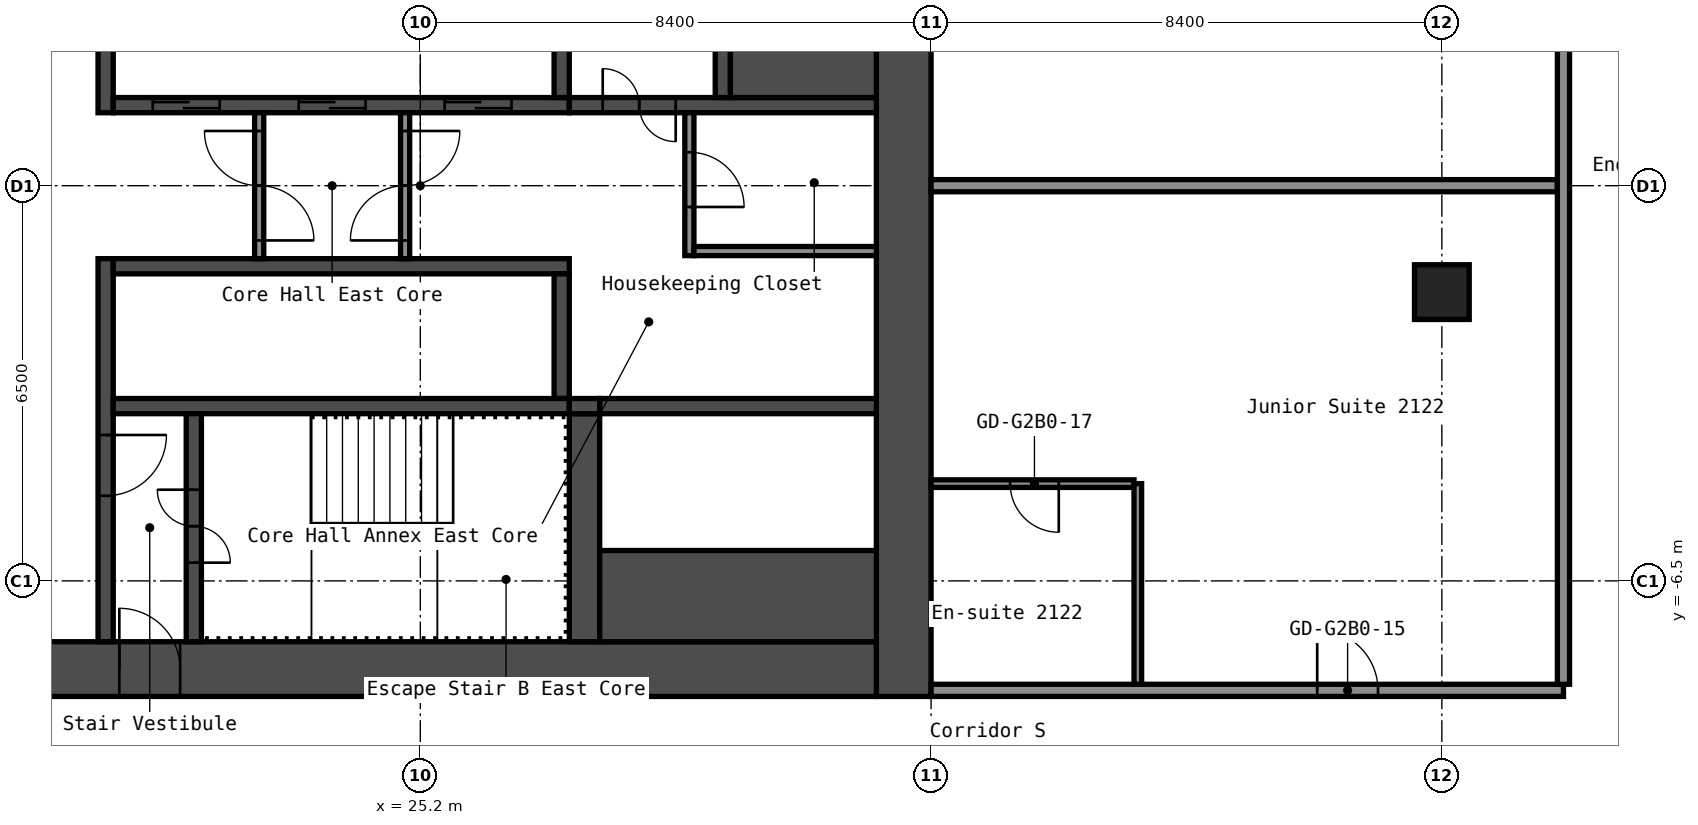
"""IFC4 building model, lengths in metres.
Left out: names, types, materials, properties, quantities, classifications, styles, units other than length and angle.
Written with IfcOpenShell. Run it as: python <this file> out.ifc"""

import sys

from ifc_helpers import new_model, si_unit, direction, frame, frame_2d, origin, origin_2d, place, context, subcontext, project, spatial, rectangle, hollow_rectangle, extrude, element, fill, save


model = new_model("IFC4")
c1 = context("Model", 3, precision=1e-05, world=origin(), true_north=direction((0.0, 1.0)))
c2 = subcontext(c1, "Body", "Model", "MODEL_VIEW")
j1 = project(units=[si_unit("LENGTHUNIT", "METRE"), si_unit("PLANEANGLEUNIT", "RADIAN")], contexts=[c1])
p1 = place(None, origin())
s1 = spatial("IfcSite", under=j1, at=p1, CompositionType="ELEMENT")
p2 = place(p1, origin())
s2 = spatial("IfcBuilding", under=s1, at=p2, CompositionType="ELEMENT")
p3 = place(p2, frame((0.0, 0.0, 78.6)))
s3 = spatial("IfcBuildingStorey", under=s2, at=p3, CompositionType="ELEMENT", Elevation=78.6)
p4 = place(p3, frame((42.0, -1.75, 0.0), z_axis=(0.0, 0.0, 1.0), x_axis=(1.0, 0.0, 0.0)))
e1 = element("IfcColumn", 1, at=p4, inside=s3, PredefinedType="COLUMN", context=c2, shape_type="SweptSolid", body=[
    extrude(hollow_rectangle(XDim=0.9, YDim=0.9, WallThickness=0.036, at=origin_2d()), origin(), (0.0, 0.0, 1.0), 2.8),
])
p5 = place(p3, frame((33.15, -8.4, 0.0), z_axis=(0.0, 0.0, 1.0), x_axis=(0.0, 1.0, 0.0)))
e2 = element("IfcWall", 2, at=p5, inside=s3, PredefinedType="SHEAR", context=c2, shape_type="SweptSolid", body=[
    extrude(rectangle(XDim=16.8, YDim=0.9, at=frame_2d((8.4, 0.0))), origin(), (0.0, 0.0, 1.0), 2.8),
])
p6 = place(p3, frame((17.7, -7.95, 0.0), z_axis=(0.0, 0.0, 1.0), x_axis=(1.0, 0.0, 0.0)))
e3 = element("IfcWall", 3, at=p6, inside=s3, PredefinedType="SHEAR", context=c2, shape_type="SweptSolid", body=[
    extrude(rectangle(XDim=15.0, YDim=0.9, at=frame_2d((7.5, 0.0))), origin(), (0.0, 0.0, 1.0), 2.8),
])
p7 = place(p6, frame((2.55, 0.0, 0.0)))
e4 = element("IfcOpeningElement", 4, at=p7, cuts=e3, PredefinedType="OPENING", context=c2, shape_type="SweptSolid", body=[
    extrude(rectangle(XDim=1.0, YDim=2.1, at=frame_2d((0.5, 1.05))), frame((0.0, 0.46, 0.0), z_axis=(0.0, -1.0, 0.0), x_axis=(1.0, 0.0, 0.0)), (0.0, 0.0, 1.0), 0.92),
])
p8 = place(p3, frame((20.025, 1.2, 0.0), z_axis=(0.0, 0.0, 1.0), x_axis=(0.0, 1.0, 0.0)))
e5 = element("IfcWall", 5, at=p8, inside=s3, PredefinedType="SHEAR", context=c2, shape_type="SweptSolid", body=[
    extrude(rectangle(XDim=6.3, YDim=0.25, at=frame_2d((3.15, 0.0))), origin(), (0.0, 0.0, 1.0), 2.8),
])
p9 = place(p3, frame((20.025, -7.5, 0.0), z_axis=(0.0, 0.0, 1.0), x_axis=(0.0, 1.0, 0.0)))
e6 = element("IfcWall", 6, at=p9, inside=s3, PredefinedType="SHEAR", context=c2, shape_type="SweptSolid", body=[
    extrude(rectangle(XDim=6.3, YDim=0.25, at=frame_2d((3.15, 0.0))), origin(), (0.0, 0.0, 1.0), 2.8),
])
p10 = place(p9, frame((2.4, 0.0, 0.0)))
e7 = element("IfcOpeningElement", 7, at=p10, cuts=e6, PredefinedType="OPENING", context=c2, shape_type="SweptSolid", body=[
    extrude(rectangle(XDim=1.0, YDim=2.1, at=frame_2d((0.5, 1.05))), frame((0.0, 0.135, 0.0), z_axis=(0.0, -1.0, 0.0), x_axis=(1.0, 0.0, 0.0)), (0.0, 0.0, 1.0), 0.27),
])
p11 = place(p3, frame((20.15, 1.325, 0.0), z_axis=(0.0, 0.0, 1.0), x_axis=(1.0, 0.0, 0.0)))
e8 = element("IfcWall", 8, at=p11, inside=s3, PredefinedType="SHEAR", context=c2, shape_type="SweptSolid", body=[
    extrude(rectangle(XDim=7.5, YDim=0.25, at=frame_2d((3.75, 0.0))), origin(), (0.0, 0.0, 1.0), 2.8),
])
p12 = place(p11, frame((0.65, 0.0, 0.0)))
e9 = element("IfcOpeningElement", 9, at=p12, cuts=e8, PredefinedType="OPENING", context=c2, shape_type="SweptSolid", body=[
    extrude(rectangle(XDim=1.1, YDim=2.1, at=frame_2d((0.55, 1.05))), frame((0.0, 0.135, 0.0), z_axis=(0.0, -1.0, 0.0), x_axis=(1.0, 0.0, 0.0)), (0.0, 0.0, 1.0), 0.27),
])
p13 = place(p11, frame((3.05, 0.0, 0.0)))
e10 = element("IfcOpeningElement", 10, at=p13, cuts=e8, PredefinedType="OPENING", context=c2, shape_type="SweptSolid", body=[
    extrude(rectangle(XDim=1.1, YDim=2.1, at=frame_2d((0.55, 1.05))), frame((0.0, 0.135, 0.0), z_axis=(0.0, -1.0, 0.0), x_axis=(1.0, 0.0, 0.0)), (0.0, 0.0, 1.0), 0.27),
])
p14 = place(p11, frame((5.45, 0.0, 0.0)))
e11 = element("IfcOpeningElement", 11, at=p14, cuts=e8, PredefinedType="OPENING", context=c2, shape_type="SweptSolid", body=[
    extrude(rectangle(XDim=1.1, YDim=2.1, at=frame_2d((0.55, 1.05))), frame((0.0, 0.135, 0.0), z_axis=(0.0, -1.0, 0.0), x_axis=(1.0, 0.0, 0.0)), (0.0, 0.0, 1.0), 0.27),
])
p15 = place(p3, frame((27.525, 1.45, 0.0), z_axis=(0.0, 0.0, 1.0), x_axis=(0.0, 1.0, 0.0)))
e12 = element("IfcWall", 12, at=p15, inside=s3, PredefinedType="SHEAR", context=c2, shape_type="SweptSolid", body=[
    extrude(rectangle(XDim=2.05, YDim=0.25, at=frame_2d((1.025, 0.0))), origin(), (0.0, 0.0, 1.0), 2.8),
])
p16 = place(p3, frame((27.65, 1.325, 0.0), z_axis=(0.0, 0.0, 1.0), x_axis=(1.0, 0.0, 0.0)))
e13 = element("IfcWall", 13, at=p16, inside=s3, PredefinedType="SHEAR", context=c2, shape_type="SweptSolid", body=[
    extrude(rectangle(XDim=5.05, YDim=0.25, at=frame_2d((2.525, 0.0))), origin(), (0.0, 0.0, 1.0), 2.8),
])
p17 = place(p16, frame((0.55, 0.0, 0.0)))
e14 = element("IfcOpeningElement", 14, at=p17, cuts=e13, PredefinedType="OPENING", context=c2, shape_type="SweptSolid", body=[
    extrude(rectangle(XDim=1.2, YDim=2.1, at=frame_2d((0.6, 1.05))), frame((0.0, 0.135, 0.0), z_axis=(0.0, -1.0, 0.0), x_axis=(1.0, 0.0, 0.0)), (0.0, 0.0, 1.0), 0.27),
])
p18 = place(p3, frame((30.175, 1.45, 0.0), z_axis=(0.0, 0.0, 1.0), x_axis=(0.0, 1.0, 0.0)))
e15 = element("IfcWall", 15, at=p18, inside=s3, PredefinedType="SHEAR", context=c2, shape_type="SweptSolid", body=[
    extrude(rectangle(XDim=6.05, YDim=0.25, at=frame_2d((3.025, 0.0))), origin(), (0.0, 0.0, 1.0), 2.8),
])
p19 = place(p18, frame((2.625, 0.0, 0.0)))
e16 = element("IfcOpeningElement", 16, at=p19, cuts=e15, PredefinedType="OPENING", context=c2, shape_type="SweptSolid", body=[
    extrude(rectangle(XDim=1.1, YDim=2.1, at=frame_2d((0.55, 1.05))), frame((0.0, 0.135, 0.0), z_axis=(0.0, -1.0, 0.0), x_axis=(1.0, 0.0, 0.0)), (0.0, 0.0, 1.0), 0.27),
])
p20 = place(p3, frame((30.3, 2.375, 0.0), z_axis=(0.0, 0.0, 1.0), x_axis=(1.0, 0.0, 0.0)))
e17 = element("IfcWall", 17, at=p20, inside=s3, PredefinedType="SHEAR", context=c2, shape_type="SweptSolid", body=[
    extrude(rectangle(XDim=2.4, YDim=1.85, at=frame_2d((1.2, 0.0))), origin(), (0.0, 0.0, 1.0), 2.8),
])
p21 = place(p3, frame((20.15, -1.325, 0.0), z_axis=(0.0, 0.0, 1.0), x_axis=(1.0, 0.0, 0.0)))
e18 = element("IfcWall", 18, at=p21, inside=s3, PredefinedType="SHEAR", context=c2, shape_type="SweptSolid", body=[
    extrude(rectangle(XDim=7.5, YDim=0.25, at=frame_2d((3.75, 0.0))), origin(), (0.0, 0.0, 1.0), 2.8),
])
p22 = place(p3, frame((27.525, -3.5, 0.0), z_axis=(0.0, 0.0, 1.0), x_axis=(0.0, 1.0, 0.0)))
e19 = element("IfcWall", 19, at=p22, inside=s3, PredefinedType="SHEAR", context=c2, shape_type="SweptSolid", body=[
    extrude(rectangle(XDim=2.05, YDim=0.25, at=frame_2d((1.025, 0.0))), origin(), (0.0, 0.0, 1.0), 2.8),
])
p23 = place(p3, frame((20.15, -3.625, 0.0), z_axis=(0.0, 0.0, 1.0), x_axis=(1.0, 0.0, 0.0)))
e20 = element("IfcWall", 20, at=p23, inside=s3, PredefinedType="SHEAR", context=c2, shape_type="SweptSolid", body=[
    extrude(rectangle(XDim=7.5, YDim=0.25, at=frame_2d((3.75, 0.0))), origin(), (0.0, 0.0, 1.0), 2.8),
])
p24 = place(p3, frame((21.475, -7.5, 0.0), z_axis=(0.0, 0.0, 1.0), x_axis=(0.0, 1.0, 0.0)))
e21 = element("IfcWall", 21, at=p24, inside=s3, PredefinedType="SHEAR", context=c2, shape_type="SweptSolid", body=[
    extrude(rectangle(XDim=3.75, YDim=0.25, at=frame_2d((1.875, 0.0))), origin(), (0.0, 0.0, 1.0), 2.8),
])
p25 = place(p24, frame((1.3, 0.0, 0.0)))
e22 = element("IfcOpeningElement", 22, at=p25, cuts=e21, PredefinedType="OPENING", context=c2, shape_type="SweptSolid", body=[
    extrude(rectangle(XDim=1.2, YDim=2.1, at=frame_2d((0.6, 1.05))), frame((0.0, 0.135, 0.0), z_axis=(0.0, -1.0, 0.0), x_axis=(1.0, 0.0, 0.0)), (0.0, 0.0, 1.0), 0.27),
])
p26 = place(p3, frame((27.9, -7.5, 0.0), z_axis=(0.0, 0.0, 1.0), x_axis=(0.0, 1.0, 0.0)))
e23 = element("IfcWall", 23, at=p26, inside=s3, PredefinedType="SHEAR", context=c2, shape_type="SweptSolid", body=[
    extrude(rectangle(XDim=3.75, YDim=0.5, at=frame_2d((1.875, 0.0))), origin(), (0.0, 0.0, 1.0), 2.8),
])
p27 = place(p3, frame((28.15, -3.625, 0.0), z_axis=(0.0, 0.0, 1.0), x_axis=(1.0, 0.0, 0.0)))
e24 = element("IfcWall", 24, at=p27, inside=s3, PredefinedType="SHEAR", context=c2, shape_type="SweptSolid", body=[
    extrude(rectangle(XDim=4.55, YDim=0.25, at=frame_2d((2.275, 0.0))), origin(), (0.0, 0.0, 1.0), 2.8),
])
p28 = place(p3, frame((28.15, -6.75, 0.0), z_axis=(0.0, 0.0, 1.0), x_axis=(1.0, 0.0, 0.0)))
e25 = element("IfcWall", 25, at=p28, inside=s3, PredefinedType="SHEAR", context=c2, shape_type="SweptSolid", body=[
    extrude(rectangle(XDim=4.55, YDim=1.5, at=frame_2d((2.275, 0.0))), origin(), (0.0, 0.0, 1.0), 2.8),
])
p29 = place(p3, frame((27.65, -3.625, 0.0), z_axis=(0.0, 0.0, 1.0), x_axis=(1.0, 0.0, 0.0)))
e26 = element("IfcWall", 26, at=p29, inside=s3, PredefinedType="SHEAR", context=c2, shape_type="SweptSolid", body=[
    extrude(rectangle(XDim=0.5, YDim=0.25, at=frame_2d((0.25, 0.0))), origin(), (0.0, 0.0, 1.0), 2.8),
])
p30 = place(p3, frame((22.55, -1.2, 0.0), z_axis=(0.0, 0.0, 1.0), x_axis=(0.0, 1.0, 0.0)))
e27 = element("IfcWall", 27, at=p30, inside=s3, PredefinedType="PARTITIONING", context=c2, shape_type="SweptSolid", body=[
    extrude(rectangle(XDim=2.4, YDim=0.15, at=frame_2d((1.2, 0.0))), origin(), (0.0, 0.0, 1.0), 2.8),
])
p31 = place(p30, frame((0.3, 0.0, 0.0)))
e28 = element("IfcOpeningElement", 28, at=p31, cuts=e27, PredefinedType="OPENING", context=c2, shape_type="SweptSolid", body=[
    extrude(rectangle(XDim=1.8, YDim=2.1, at=frame_2d((0.9, 1.05))), frame((0.0, 0.085, 0.0), z_axis=(0.0, -1.0, 0.0), x_axis=(1.0, 0.0, 0.0)), (0.0, 0.0, 1.0), 0.17),
])
p32 = place(p3, frame((24.95, -1.2, 0.0), z_axis=(0.0, 0.0, 1.0), x_axis=(0.0, 1.0, 0.0)))
e29 = element("IfcWall", 29, at=p32, inside=s3, PredefinedType="PARTITIONING", context=c2, shape_type="SweptSolid", body=[
    extrude(rectangle(XDim=2.4, YDim=0.15, at=frame_2d((1.2, 0.0))), origin(), (0.0, 0.0, 1.0), 2.8),
])
p33 = place(p32, frame((0.3, 0.0, 0.0)))
e30 = element("IfcOpeningElement", 30, at=p33, cuts=e29, PredefinedType="OPENING", context=c2, shape_type="SweptSolid", body=[
    extrude(rectangle(XDim=1.8, YDim=2.1, at=frame_2d((0.9, 1.05))), frame((0.0, 0.085, 0.0), z_axis=(0.0, -1.0, 0.0), x_axis=(1.0, 0.0, 0.0)), (0.0, 0.0, 1.0), 0.17),
])
p34 = place(p3, frame((29.625, -1.15, 0.0), z_axis=(0.0, 0.0, 1.0), x_axis=(0.0, 1.0, 0.0)))
e31 = element("IfcWall", 31, at=p34, inside=s3, PredefinedType="PARTITIONING", context=c2, shape_type="SweptSolid", body=[
    extrude(rectangle(XDim=2.35, YDim=0.15, at=frame_2d((1.175, 0.0))), origin(), (0.0, 0.0, 1.0), 2.8),
])
p35 = place(p34, frame((0.8, 0.0, 0.0)))
e32 = element("IfcOpeningElement", 32, at=p35, cuts=e31, PredefinedType="OPENING", context=c2, shape_type="SweptSolid", body=[
    extrude(rectangle(XDim=0.9, YDim=2.1, at=frame_2d((0.45, 1.05))), frame((0.0, 0.085, 0.0), z_axis=(0.0, -1.0, 0.0), x_axis=(1.0, 0.0, 0.0)), (0.0, 0.0, 1.0), 0.17),
])
p36 = place(p3, frame((29.7, -1.075, 0.0), z_axis=(0.0, 0.0, 1.0), x_axis=(1.0, 0.0, 0.0)))
e33 = element("IfcWall", 33, at=p36, inside=s3, PredefinedType="PARTITIONING", context=c2, shape_type="SweptSolid", body=[
    extrude(rectangle(XDim=3.0, YDim=0.15, at=frame_2d((1.5, 0.0))), origin(), (0.0, 0.0, 1.0), 2.8),
])
p37 = place(p3, frame((33.6, -8.3, 0.0), z_axis=(0.0, 0.0, 1.0), x_axis=(1.0, 0.0, 0.0)))
e34 = element("IfcWall", 34, at=p37, inside=s3, PredefinedType="PARTITIONING", context=c2, shape_type="SweptSolid", body=[
    extrude(rectangle(XDim=10.4, YDim=0.2, at=frame_2d((5.2, 0.0))), origin(), (0.0, 0.0, 1.0), 2.8),
])
p38 = place(p37, frame((6.35, 0.0, 0.0)))
e35 = element("IfcOpeningElement", 35, at=p38, cuts=e34, PredefinedType="OPENING", context=c2, shape_type="SweptSolid", body=[
    extrude(rectangle(XDim=1.0, YDim=2.1, at=frame_2d((0.5, 1.05))), frame((0.0, 0.11, 0.0), z_axis=(0.0, -1.0, 0.0), x_axis=(1.0, 0.0, 0.0)), (0.0, 0.0, 1.0), 0.22),
])
p39 = place(p3, frame((33.6, -4.9, 0.0), z_axis=(0.0, 0.0, 1.0), x_axis=(1.0, 0.0, 0.0)))
e36 = element("IfcWall", 36, at=p39, inside=s3, PredefinedType="PARTITIONING", context=c2, shape_type="SweptSolid", body=[
    extrude(rectangle(XDim=3.337, YDim=0.125, at=frame_2d((1.669, 0.0))), origin(), (0.0, 0.0, 1.0), 2.8),
])
p40 = place(p39, frame((1.3, 0.0, 0.0)))
e37 = element("IfcOpeningElement", 37, at=p40, cuts=e36, PredefinedType="OPENING", context=c2, shape_type="SweptSolid", body=[
    extrude(rectangle(XDim=0.8, YDim=2.1, at=frame_2d((0.4, 1.05))), frame((0.0, 0.073, 0.0), z_axis=(0.0, -1.0, 0.0), x_axis=(1.0, 0.0, 0.0)), (0.0, 0.0, 1.0), 0.145),
])
p41 = place(p3, frame((33.6, 0.0, 0.0), z_axis=(0.0, 0.0, 1.0), x_axis=(1.0, 0.0, 0.0)))
e38 = element("IfcWall", 38, at=p41, inside=s3, PredefinedType="PARTITIONING", context=c2, shape_type="SweptSolid", body=[
    extrude(rectangle(XDim=10.3, YDim=0.2, at=frame_2d((5.15, 0.0))), origin(), (0.0, 0.0, 1.0), 2.8),
])
p42 = place(p3, frame((37.0, -8.2, 0.0), z_axis=(0.0, 0.0, 1.0), x_axis=(0.0, 1.0, 0.0)))
e39 = element("IfcWall", 39, at=p42, inside=s3, PredefinedType="PARTITIONING", context=c2, shape_type="SweptSolid", body=[
    extrude(rectangle(XDim=3.3, YDim=0.125, at=frame_2d((1.65, 0.0))), origin(), (0.0, 0.0, 1.0), 2.8),
])
p43 = place(p3, frame((44.0, -8.2, 0.0), z_axis=(0.0, 0.0, 1.0), x_axis=(0.0, 1.0, 0.0)))
e40 = element("IfcWall", 40, at=p43, inside=s3, PredefinedType="PARTITIONING", context=c2, shape_type="SweptSolid", body=[
    extrude(rectangle(XDim=16.4, YDim=0.2, at=frame_2d((8.2, 0.0))), origin(), (0.0, 0.0, 1.0), 2.8),
])
p44 = place(p7, origin())
e41 = element("IfcDoor", 41, at=p44, inside=s3, OperationType="SINGLE_SWING_RIGHT", PredefinedType="DOOR", context=c2, shape_type="SweptSolid", body=[
    extrude(rectangle(XDim=1.0, YDim=2.1, at=frame_2d((0.5, 1.05))), frame((0.0, 0.025, 0.0), z_axis=(0.0, -1.0, 0.0), x_axis=(1.0, 0.0, 0.0)), (0.0, 0.0, 1.0), 0.05),
])
fill(e4, e41)
p45 = place(p25, origin())
e42 = element("IfcDoor", 42, at=p45, inside=s3, OperationType="DOUBLE_DOOR_SINGLE_SWING", PredefinedType="DOOR", context=c2, shape_type="SweptSolid", body=[
    extrude(rectangle(XDim=1.2, YDim=2.1, at=frame_2d((0.6, 1.05))), frame((0.0, 0.025, 0.0), z_axis=(0.0, -1.0, 0.0), x_axis=(1.0, 0.0, 0.0)), (0.0, 0.0, 1.0), 0.05),
])
fill(e22, e42)
p46 = place(p10, origin())
e43 = element("IfcDoor", 43, at=p46, inside=s3, OperationType="SINGLE_SWING_RIGHT", PredefinedType="DOOR", context=c2, shape_type="SweptSolid", body=[
    extrude(rectangle(XDim=1.0, YDim=2.1, at=frame_2d((0.5, 1.05))), frame((0.0, 0.025, 0.0), z_axis=(0.0, -1.0, 0.0), x_axis=(1.0, 0.0, 0.0)), (0.0, 0.0, 1.0), 0.05),
])
fill(e7, e43)
p47 = place(p17, origin())
e44 = element("IfcDoor", 44, at=p47, inside=s3, OperationType="DOUBLE_DOOR_SINGLE_SWING", PredefinedType="DOOR", context=c2, shape_type="SweptSolid", body=[
    extrude(rectangle(XDim=1.2, YDim=2.1, at=frame_2d((0.6, 1.05))), frame((0.0, 0.025, 0.0), z_axis=(0.0, -1.0, 0.0), x_axis=(1.0, 0.0, 0.0)), (0.0, 0.0, 1.0), 0.05),
])
fill(e14, e44)
p48 = place(p31, origin())
e45 = element("IfcDoor", 45, at=p48, inside=s3, OperationType="DOUBLE_DOOR_SINGLE_SWING", PredefinedType="DOOR", context=c2, shape_type="SweptSolid", body=[
    extrude(rectangle(XDim=1.8, YDim=2.1, at=frame_2d((0.9, 1.05))), frame((0.0, 0.025, 0.0), z_axis=(0.0, -1.0, 0.0), x_axis=(1.0, 0.0, 0.0)), (0.0, 0.0, 1.0), 0.05),
])
fill(e28, e45)
p49 = place(p33, origin())
e46 = element("IfcDoor", 46, at=p49, inside=s3, OperationType="DOUBLE_DOOR_SINGLE_SWING", PredefinedType="DOOR", context=c2, shape_type="SweptSolid", body=[
    extrude(rectangle(XDim=1.8, YDim=2.1, at=frame_2d((0.9, 1.05))), frame((0.0, 0.025, 0.0), z_axis=(0.0, -1.0, 0.0), x_axis=(1.0, 0.0, 0.0)), (0.0, 0.0, 1.0), 0.05),
])
fill(e30, e46)
p50 = place(p35, origin())
e47 = element("IfcDoor", 47, at=p50, inside=s3, OperationType="SINGLE_SWING_LEFT", PredefinedType="DOOR", context=c2, shape_type="SweptSolid", body=[
    extrude(rectangle(XDim=0.9, YDim=2.1, at=frame_2d((0.45, 1.05))), frame((0.0, 0.025, 0.0), z_axis=(0.0, -1.0, 0.0), x_axis=(1.0, 0.0, 0.0)), (0.0, 0.0, 1.0), 0.05),
])
fill(e32, e47)
p51 = place(p12, origin())
e48 = element("IfcDoor", 48, at=p51, inside=s3, OperationType="DOUBLE_DOOR_SLIDING", PredefinedType="DOOR", context=c2, shape_type="SweptSolid", body=[
    extrude(rectangle(XDim=1.1, YDim=2.1, at=frame_2d((0.55, 1.05))), frame((0.0, 0.025, 0.0), z_axis=(0.0, -1.0, 0.0), x_axis=(1.0, 0.0, 0.0)), (0.0, 0.0, 1.0), 0.05),
])
fill(e9, e48)
p52 = place(p13, origin())
e49 = element("IfcDoor", 49, at=p52, inside=s3, OperationType="DOUBLE_DOOR_SLIDING", PredefinedType="DOOR", context=c2, shape_type="SweptSolid", body=[
    extrude(rectangle(XDim=1.1, YDim=2.1, at=frame_2d((0.55, 1.05))), frame((0.0, 0.025, 0.0), z_axis=(0.0, -1.0, 0.0), x_axis=(1.0, 0.0, 0.0)), (0.0, 0.0, 1.0), 0.05),
])
fill(e10, e49)
p53 = place(p14, origin())
e50 = element("IfcDoor", 50, at=p53, inside=s3, OperationType="DOUBLE_DOOR_SLIDING", PredefinedType="DOOR", context=c2, shape_type="SweptSolid", body=[
    extrude(rectangle(XDim=1.1, YDim=2.1, at=frame_2d((0.55, 1.05))), frame((0.0, 0.025, 0.0), z_axis=(0.0, -1.0, 0.0), x_axis=(1.0, 0.0, 0.0)), (0.0, 0.0, 1.0), 0.05),
])
fill(e11, e50)
p54 = place(p38, origin())
e51 = element("IfcDoor", 51, at=p54, inside=s3, OperationType="SINGLE_SWING_RIGHT", PredefinedType="DOOR", context=c2, shape_type="SweptSolid", body=[
    extrude(rectangle(XDim=1.0, YDim=2.1, at=frame_2d((0.5, 1.05))), frame((0.0, 0.025, 0.0), z_axis=(0.0, -1.0, 0.0), x_axis=(1.0, 0.0, 0.0)), (0.0, 0.0, 1.0), 0.05),
])
fill(e35, e51)
p55 = place(p40, origin())
e52 = element("IfcDoor", 52, at=p55, inside=s3, OperationType="SINGLE_SWING_RIGHT", PredefinedType="DOOR", context=c2, shape_type="SweptSolid", body=[
    extrude(rectangle(XDim=0.8, YDim=2.1, at=frame_2d((0.4, 1.05))), frame((0.0, 0.025, 0.0), z_axis=(0.0, -1.0, 0.0), x_axis=(1.0, 0.0, 0.0)), (0.0, 0.0, 1.0), 0.05),
])
fill(e37, e52)
save(model, sys.argv[1])
